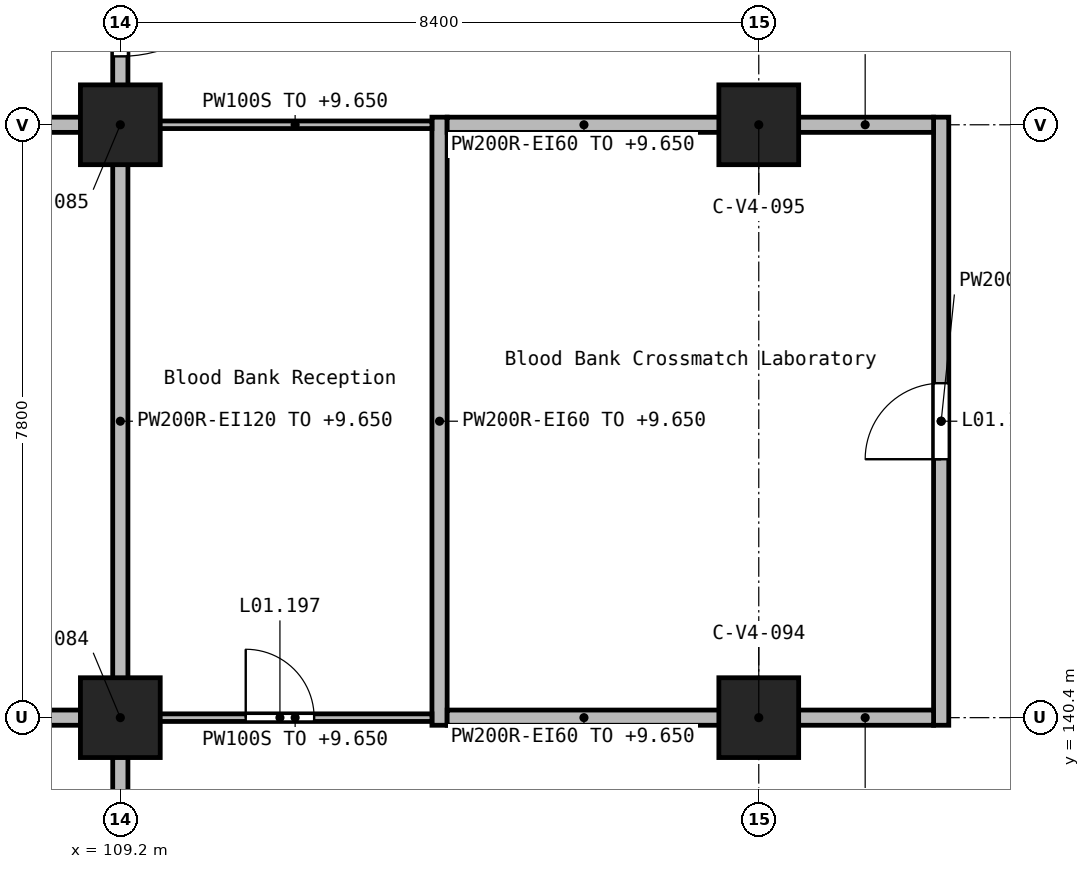
"""IFC4 building model, lengths in metres.
Left out: names, types, materials, properties, quantities, classifications, styles, units other than length and angle.
Written with IfcOpenShell. Run it as: python <this file> out.ifc"""

import sys

from ifc_helpers import new_model, si_unit, direction, frame, frame_2d, origin, origin_2d, place, context, subcontext, project, spatial, rectangle, extrude, element, fill, save


model = new_model("IFC4")
c1 = context("Model", 3, precision=1e-05, world=origin(), true_north=direction((0.0, 1.0)))
c2 = subcontext(c1, "Body", "Model", "MODEL_VIEW")
j1 = project(units=[si_unit("LENGTHUNIT", "METRE"), si_unit("PLANEANGLEUNIT", "RADIAN")], contexts=[c1])
p1 = place(None, origin())
s1 = spatial("IfcSite", under=j1, at=p1, CompositionType="ELEMENT")
p2 = place(p1, origin())
s2 = spatial("IfcBuilding", under=s1, at=p2, CompositionType="ELEMENT")
p3 = place(p2, frame((0.0, 0.0, 5.4)))
s3 = spatial("IfcBuildingStorey", under=s2, at=p3, CompositionType="ELEMENT", Elevation=5.4)
for number, where, z_axis, x_axis in (
    (1, (109.2, 140.4, 0.0), (0.0, 0.0, 1.0), (1.0, 0.0, 0.0)),
    (2, (109.2, 148.2, 0.0), (0.0, 0.0, 1.0), (1.0, 0.0, 0.0)),
    (3, (117.6, 140.4, 0.0), (0.0, 0.0, 1.0), (1.0, 0.0, 0.0)),
    (4, (117.6, 148.2, 0.0), (0.0, 0.0, 1.0), (1.0, 0.0, 0.0)),
):
    element("IfcColumn", number, at=place(p3, frame(where, z_axis=z_axis, x_axis=x_axis)), inside=s3, PredefinedType="COLUMN", context=c2, shape_type="SweptSolid", body=[
        extrude(rectangle(XDim=1.05, YDim=1.05, at=origin_2d()), origin(), (0.0, 0.0, 1.0), 4.5),
    ])
p4 = place(p3, frame((109.2, 151.3, 0.0), z_axis=(0.0, 0.0, 1.0), x_axis=(0.0, -1.0, 0.0)))
e5 = element("IfcWall", 5, at=p4, inside=s3, PredefinedType="SOLIDWALL", context=c2, shape_type="SweptSolid", body=[
    extrude(rectangle(XDim=2.6, YDim=0.2, at=frame_2d((1.3, 0.0))), origin(), (0.0, 0.0, 1.0), 4.25),
])
p5 = place(p4, frame((0.4, 0.0, 0.0)))
e6 = element("IfcOpeningElement", 6, at=p5, cuts=e5, PredefinedType="OPENING", context=c2, shape_type="SweptSolid", body=[
    extrude(rectangle(XDim=1.8, YDim=2.1, at=frame_2d((0.9, 1.05))), frame((0.0, 0.11, 0.0), z_axis=(0.0, -1.0, 0.0), x_axis=(1.0, 0.0, 0.0)), (0.0, 0.0, 1.0), 0.22),
])
p6 = place(p3, frame((109.2, 147.7, 0.0), z_axis=(0.0, 0.0, 1.0), x_axis=(0.0, -1.0, 0.0)))
e7 = element("IfcWall", 7, at=p6, inside=s3, PredefinedType="SOLIDWALL", context=c2, shape_type="SweptSolid", body=[
    extrude(rectangle(XDim=6.8, YDim=0.2, at=frame_2d((3.4, 0.0))), origin(), (0.0, 0.0, 1.0), 4.25),
])
p7 = place(p3, frame((109.2, 139.9, 0.0), z_axis=(0.0, 0.0, 1.0), x_axis=(0.0, -1.0, 0.0)))
e8 = element("IfcWall", 8, at=p7, inside=s3, PredefinedType="SOLIDWALL", context=c2, shape_type="SweptSolid", body=[
    extrude(rectangle(XDim=2.65, YDim=0.2, at=frame_2d((1.325, 0.0))), origin(), (0.0, 0.0, 1.0), 4.25),
])
p8 = place(p3, frame((113.4, 140.3, 0.0), z_axis=(0.0, 0.0, 1.0), x_axis=(0.0, 1.0, 0.0)))
e9 = element("IfcWall", 9, at=p8, inside=s3, PredefinedType="SOLIDWALL", context=c2, shape_type="SweptSolid", body=[
    extrude(rectangle(XDim=8.0, YDim=0.2, at=frame_2d((4.0, 0.0))), origin(), (0.0, 0.0, 1.0), 4.25),
])
p9 = place(p3, frame((120.0, 140.3, 0.0), z_axis=(0.0, 0.0, 1.0), x_axis=(0.0, 1.0, 0.0)))
e10 = element("IfcWall", 10, at=p9, inside=s3, PredefinedType="SOLIDWALL", context=c2, shape_type="SweptSolid", body=[
    extrude(rectangle(XDim=8.0, YDim=0.2, at=frame_2d((4.0, 0.0))), origin(), (0.0, 0.0, 1.0), 4.25),
])
p10 = place(p9, frame((3.5, 0.0, 0.0)))
e11 = element("IfcOpeningElement", 11, at=p10, cuts=e10, PredefinedType="OPENING", context=c2, shape_type="SweptSolid", body=[
    extrude(rectangle(XDim=1.0, YDim=2.1, at=frame_2d((0.5, 1.05))), frame((0.0, 0.11, 0.0), z_axis=(0.0, -1.0, 0.0), x_axis=(1.0, 0.0, 0.0)), (0.0, 0.0, 1.0), 0.22),
])
p11 = place(p3, frame((102.1, 140.4, 0.0), z_axis=(0.0, 0.0, 1.0), x_axis=(1.0, 0.0, 0.0)))
e12 = element("IfcWall", 12, at=p11, inside=s3, PredefinedType="SOLIDWALL", context=c2, shape_type="SweptSolid", body=[
    extrude(rectangle(XDim=6.6, YDim=0.2, at=frame_2d((3.3, 0.0))), origin(), (0.0, 0.0, 1.0), 4.25),
])
p12 = place(p11, frame((3.0, 0.0, 0.0)))
e13 = element("IfcOpeningElement", 13, at=p12, cuts=e12, PredefinedType="OPENING", context=c2, shape_type="SweptSolid", body=[
    extrude(rectangle(XDim=1.0, YDim=2.1, at=frame_2d((0.5, 1.05))), frame((0.0, 0.11, 0.0), z_axis=(0.0, -1.0, 0.0), x_axis=(1.0, 0.0, 0.0)), (0.0, 0.0, 1.0), 0.22),
])
p13 = place(p3, frame((102.1, 148.2, 0.0), z_axis=(0.0, 0.0, 1.0), x_axis=(1.0, 0.0, 0.0)))
e14 = element("IfcWall", 14, at=p13, inside=s3, PredefinedType="SOLIDWALL", context=c2, shape_type="SweptSolid", body=[
    extrude(rectangle(XDim=6.6, YDim=0.2, at=frame_2d((3.3, 0.0))), origin(), (0.0, 0.0, 1.0), 4.25),
])
p14 = place(p3, frame((113.5, 140.4, 0.0), z_axis=(0.0, 0.0, 1.0), x_axis=(1.0, 0.0, 0.0)))
e15 = element("IfcWall", 15, at=p14, inside=s3, PredefinedType="SOLIDWALL", context=c2, shape_type="SweptSolid", body=[
    extrude(rectangle(XDim=3.6, YDim=0.2, at=frame_2d((1.8, 0.0))), origin(), (0.0, 0.0, 1.0), 4.25),
])
p15 = place(p3, frame((118.1, 140.4, 0.0), z_axis=(0.0, 0.0, 1.0), x_axis=(1.0, 0.0, 0.0)))
e16 = element("IfcWall", 16, at=p15, inside=s3, PredefinedType="SOLIDWALL", context=c2, shape_type="SweptSolid", body=[
    extrude(rectangle(XDim=1.8, YDim=0.2, at=frame_2d((0.9, 0.0))), origin(), (0.0, 0.0, 1.0), 4.25),
])
p16 = place(p3, frame((113.5, 148.2, 0.0), z_axis=(0.0, 0.0, 1.0), x_axis=(1.0, 0.0, 0.0)))
e17 = element("IfcWall", 17, at=p16, inside=s3, PredefinedType="SOLIDWALL", context=c2, shape_type="SweptSolid", body=[
    extrude(rectangle(XDim=3.6, YDim=0.2, at=frame_2d((1.8, 0.0))), origin(), (0.0, 0.0, 1.0), 4.25),
])
p17 = place(p3, frame((118.1, 148.2, 0.0), z_axis=(0.0, 0.0, 1.0), x_axis=(1.0, 0.0, 0.0)))
e18 = element("IfcWall", 18, at=p17, inside=s3, PredefinedType="SOLIDWALL", context=c2, shape_type="SweptSolid", body=[
    extrude(rectangle(XDim=1.8, YDim=0.2, at=frame_2d((0.9, 0.0))), origin(), (0.0, 0.0, 1.0), 4.25),
])
p18 = place(p3, frame((109.7, 140.4, 0.0), z_axis=(0.0, 0.0, 1.0), x_axis=(1.0, 0.0, 0.0)))
e19 = element("IfcWall", 19, at=p18, inside=s3, PredefinedType="PARTITIONING", context=c2, shape_type="SweptSolid", body=[
    extrude(rectangle(XDim=3.6, YDim=0.1, at=frame_2d((1.8, 0.0))), origin(), (0.0, 0.0, 1.0), 4.25),
])
p19 = place(p18, frame((1.15, 0.0, 0.0)))
e20 = element("IfcOpeningElement", 20, at=p19, cuts=e19, PredefinedType="OPENING", context=c2, shape_type="SweptSolid", body=[
    extrude(rectangle(XDim=0.9, YDim=2.1, at=frame_2d((0.45, 1.05))), frame((0.0, 0.06, 0.0), z_axis=(0.0, -1.0, 0.0), x_axis=(1.0, 0.0, 0.0)), (0.0, 0.0, 1.0), 0.12),
])
p20 = place(p3, frame((109.7, 148.2, 0.0), z_axis=(0.0, 0.0, 1.0), x_axis=(1.0, 0.0, 0.0)))
e21 = element("IfcWall", 21, at=p20, inside=s3, PredefinedType="PARTITIONING", context=c2, shape_type="SweptSolid", body=[
    extrude(rectangle(XDim=3.6, YDim=0.1, at=frame_2d((1.8, 0.0))), origin(), (0.0, 0.0, 1.0), 4.25),
])
p21 = place(p5, frame((1.8, 0.0, 0.0), z_axis=(0.0, 0.0, 1.0), x_axis=(-1.0, 0.0, 0.0)))
e22 = element("IfcDoor", 22, at=p21, inside=s3, OperationType="DOUBLE_DOOR_SINGLE_SWING", PredefinedType="DOOR", context=c2, shape_type="SweptSolid", body=[
    extrude(rectangle(XDim=1.8, YDim=2.1, at=frame_2d((0.9, 1.05))), frame((0.0, 0.025, 0.0), z_axis=(0.0, -1.0, 0.0), x_axis=(1.0, 0.0, 0.0)), (0.0, 0.0, 1.0), 0.05),
])
fill(e6, e22)
p22 = place(p19, origin())
e23 = element("IfcDoor", 23, at=p22, inside=s3, OperationType="SINGLE_SWING_LEFT", PredefinedType="DOOR", context=c2, shape_type="SweptSolid", body=[
    extrude(rectangle(XDim=0.9, YDim=2.1, at=frame_2d((0.45, 1.05))), frame((0.0, 0.025, 0.0), z_axis=(0.0, -1.0, 0.0), x_axis=(1.0, 0.0, 0.0)), (0.0, 0.0, 1.0), 0.05),
])
fill(e20, e23)
p23 = place(p10, origin())
e24 = element("IfcDoor", 24, at=p23, inside=s3, OperationType="SINGLE_SWING_LEFT", PredefinedType="DOOR", context=c2, shape_type="SweptSolid", body=[
    extrude(rectangle(XDim=1.0, YDim=2.1, at=frame_2d((0.5, 1.05))), frame((0.0, 0.025, 0.0), z_axis=(0.0, -1.0, 0.0), x_axis=(1.0, 0.0, 0.0)), (0.0, 0.0, 1.0), 0.05),
])
fill(e11, e24)
save(model, sys.argv[1])
